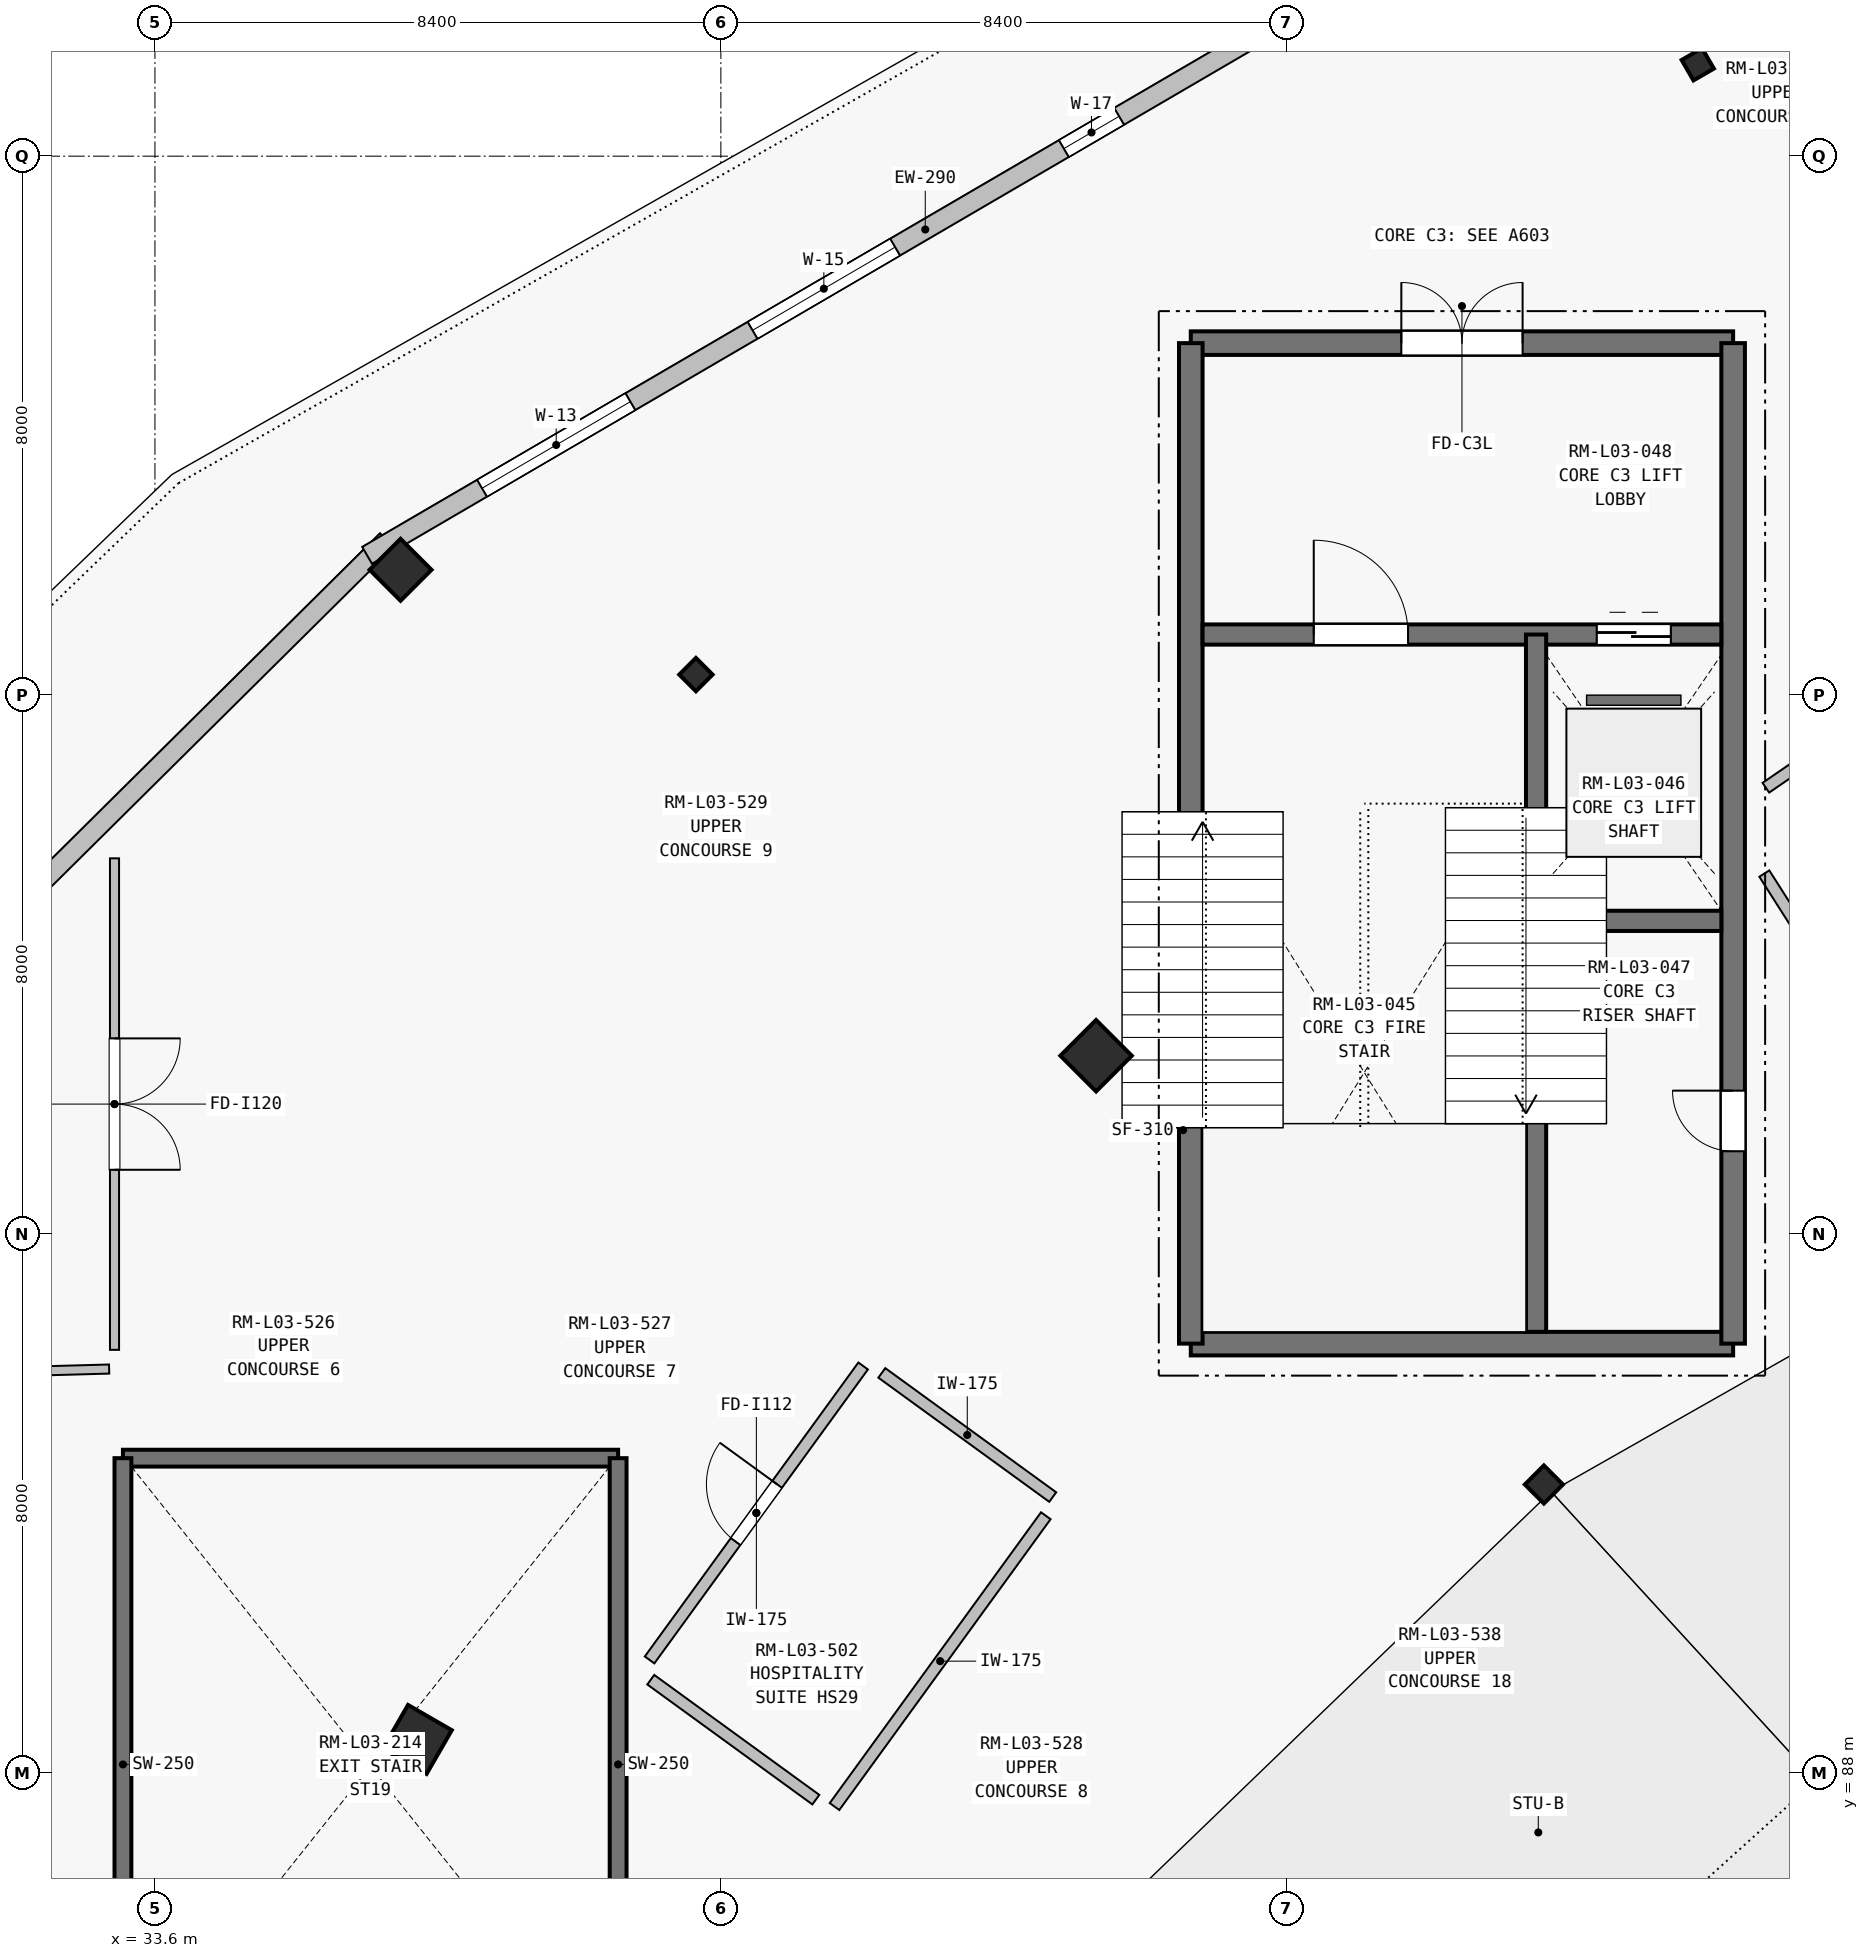
"""IFC4 building model, lengths in metres.
Left out: names, types, materials, properties, quantities, classifications, styles, units other than length and angle.
Written with IfcOpenShell. Run it as: python <this file> out.ifc"""

import sys

from ifc_helpers import new_model, si_unit, direction, frame, frame_2d, origin, origin_2d, place, context, subcontext, project, spatial, rectangle, i_section, extrude, element, fill, save


model = new_model("IFC4")
c1 = context("Model", 3, precision=1e-05, world=origin(), true_north=direction((0.0, 1.0)))
c2 = subcontext(c1, "Body", "Model", "MODEL_VIEW")
j1 = project(units=[si_unit("LENGTHUNIT", "METRE"), si_unit("PLANEANGLEUNIT", "RADIAN")], contexts=[c1])
p1 = place(None, origin())
s1 = spatial("IfcSite", under=j1, at=p1, CompositionType="ELEMENT")
p2 = place(p1, origin())
s2 = spatial("IfcBuilding", under=s1, at=p2, CompositionType="ELEMENT")
p3 = place(p2, frame((0.0, 0.0, 14.4)))
s3 = spatial("IfcBuildingStorey", under=s2, at=p3, CompositionType="ELEMENT", Elevation=14.4)
p4 = place(p3, frame((54.216, 92.284, 0.0), z_axis=(0.0, 0.0, 1.0), x_axis=(-0.707106781187, 0.707106781187, 0.0)))
e1 = element("IfcColumn", 1, at=p4, inside=s3, PredefinedType="COLUMN", context=c2, shape_type="SweptSolid", body=[
    extrude(i_section(OverallWidth=0.4, OverallDepth=0.4, WebThickness=0.016, FlangeThickness=0.028, at=origin_2d()), origin(), (0.0, 0.0, 1.0), 4.5),
])
for number, where, z_axis, x_axis in (
    (2, (47.569, 98.648, 0.0), (0.0, 0.0, 1.0), (-0.707, 0.707, 0.0)),
    (3, (37.494, 88.5, 0.0), (0.0, 0.0, 1.0), (-0.866, 0.5, 0.0)),
):
    element("IfcColumn", number, at=place(p3, frame(where, z_axis=z_axis, x_axis=x_axis)), inside=s3, PredefinedType="COLUMN", context=c2, shape_type="SweptSolid", body=[
        extrude(rectangle(XDim=0.75, YDim=0.75, at=origin_2d()), origin(), (0.0, 0.0, 1.0), 4.5),
    ])
for number, where, z_axis, x_axis in (
    (4, (56.5, 113.363, 0.0), (0.0, 0.0, 1.0), (-0.5, 0.866, 0.0)),
    (5, (41.63, 104.305, 0.0), (0.0, 0.0, 1.0), (-0.707, 0.707, 0.0)),
):
    element("IfcColumn", number, at=place(p3, frame(where, z_axis=z_axis, x_axis=x_axis)), inside=s3, PredefinedType="COLUMN", context=c2, shape_type="SweptSolid", body=[
        extrude(i_section(OverallWidth=0.35, OverallDepth=0.35, WebThickness=0.014, FlangeThickness=0.024, at=origin_2d()), origin(), (0.0, 0.0, 1.0), 4.5),
    ])
p5 = place(p3, frame((37.246, 105.861, 0.0), z_axis=(0.0, 0.0, 1.0), x_axis=(-0.707106781187, 0.707106781187, 0.0)))
e6 = element("IfcColumn", 6, at=p5, inside=s3, PredefinedType="COLUMN", context=c2, shape_type="SweptSolid", body=[
    extrude(rectangle(XDim=0.65, YDim=0.65, at=origin_2d()), origin(), (0.0, 0.0, 1.0), 4.26),
])
p6 = place(p3, frame((24.313, 93.679, 0.0), z_axis=(0.0, 0.0, 1.0), x_axis=(0.71011693404, 0.704083759214, 0.0)))
e7 = element("IfcWall", 7, at=p6, inside=s3, PredefinedType="SOLIDWALL", context=c2, shape_type="SweptSolid", body=[
    extrude(rectangle(XDim=17.927, YDim=0.29, at=frame_2d((8.963, 0.0))), origin(), (0.0, 0.0, 1.0), 4.26),
])
p7 = place(p6, frame((1.825, 0.0, 0.9)))
e8 = element("IfcOpeningElement", 8, at=p7, cuts=e7, PredefinedType="OPENING", context=c2, shape_type="SweptSolid", body=[
    extrude(rectangle(XDim=2.85, YDim=1.6, at=frame_2d((1.425, 0.8))), frame((0.0, 0.155, 0.0), z_axis=(0.0, -1.0, 0.0), x_axis=(1.0, 0.0, 0.0)), (0.0, 0.0, 1.0), 0.31),
])
p8 = place(p6, frame((6.575, 0.0, 0.9)))
e9 = element("IfcOpeningElement", 9, at=p8, cuts=e7, PredefinedType="OPENING", context=c2, shape_type="SweptSolid", body=[
    extrude(rectangle(XDim=2.55, YDim=1.55, at=frame_2d((1.275, 0.775))), frame((0.0, 0.155, 0.0), z_axis=(0.0, -1.0, 0.0), x_axis=(1.0, 0.0, 0.0)), (0.0, 0.0, 1.0), 0.31),
])
p9 = place(p3, frame((36.749, 106.075, 0.0), z_axis=(0.0, 0.0, 1.0), x_axis=(0.863607623942, 0.504164528572, 0.0)))
e10 = element("IfcWall", 10, at=p9, inside=s3, PredefinedType="SOLIDWALL", context=c2, shape_type="SweptSolid", body=[
    extrude(rectangle(XDim=19.186, YDim=0.29, at=frame_2d((9.593, 0.0))), origin(), (0.0, 0.0, 1.0), 4.26),
])
p10 = place(p9, frame((1.975, 0.0, 0.9)))
e11 = element("IfcOpeningElement", 11, at=p10, cuts=e10, PredefinedType="OPENING", context=c2, shape_type="SweptSolid", body=[
    extrude(rectangle(XDim=2.55, YDim=1.55, at=frame_2d((1.275, 0.775))), frame((0.0, 0.155, 0.0), z_axis=(0.0, -1.0, 0.0), x_axis=(1.0, 0.0, 0.0)), (0.0, 0.0, 1.0), 0.31),
])
p11 = place(p9, frame((6.625, 0.0, 0.9)))
e12 = element("IfcOpeningElement", 12, at=p11, cuts=e10, PredefinedType="OPENING", context=c2, shape_type="SweptSolid", body=[
    extrude(rectangle(XDim=2.45, YDim=1.35, at=frame_2d((1.225, 0.675))), frame((0.0, 0.155, 0.0), z_axis=(0.0, -1.0, 0.0), x_axis=(1.0, 0.0, 0.0)), (0.0, 0.0, 1.0), 0.31),
])
p12 = place(p9, frame((11.975, 0.0, 0.75)))
e13 = element("IfcOpeningElement", 13, at=p12, cuts=e10, PredefinedType="OPENING", context=c2, shape_type="SweptSolid", body=[
    extrude(rectangle(XDim=0.95, YDim=2.2, at=frame_2d((0.475, 1.1))), frame((0.0, 0.155, 0.0), z_axis=(0.0, -1.0, 0.0), x_axis=(1.0, 0.0, 0.0)), (0.0, 0.0, 1.0), 0.31),
])
p13 = place(p3, frame((48.975, 94.375, 0.0), z_axis=(0.0, 0.0, 1.0), x_axis=(1.0, 0.0, 0.0)))
e14 = element("IfcWall", 14, at=p13, inside=s3, PredefinedType="SHEAR", context=c2, shape_type="SweptSolid", body=[
    extrude(rectangle(XDim=8.05, YDim=0.35, at=frame_2d((4.025, 0.0))), origin(), (0.0, 0.0, 1.0), 4.5),
])
p14 = place(p3, frame((48.975, 109.225, 0.0), z_axis=(0.0, 0.0, 1.0), x_axis=(1.0, 0.0, 0.0)))
e15 = element("IfcWall", 15, at=p14, inside=s3, PredefinedType="SHEAR", context=c2, shape_type="SweptSolid", body=[
    extrude(rectangle(XDim=8.05, YDim=0.35, at=frame_2d((4.025, 0.0))), origin(), (0.0, 0.0, 1.0), 4.5),
])
p15 = place(p14, frame((3.125, 0.0, 0.0)))
e16 = element("IfcOpeningElement", 16, at=p15, cuts=e15, PredefinedType="OPENING", context=c2, shape_type="SweptSolid", body=[
    extrude(rectangle(XDim=1.8, YDim=2.25, at=frame_2d((0.9, 1.125))), frame((0.0, 0.185, 0.0), z_axis=(0.0, -1.0, 0.0), x_axis=(1.0, 0.0, 0.0)), (0.0, 0.0, 1.0), 0.37),
])
p16 = place(p3, frame((48.975, 94.375, 0.0), z_axis=(0.0, 0.0, 1.0), x_axis=(0.0, 1.0, 0.0)))
e17 = element("IfcWall", 17, at=p16, inside=s3, PredefinedType="SHEAR", context=c2, shape_type="SweptSolid", body=[
    extrude(rectangle(XDim=14.85, YDim=0.35, at=frame_2d((7.425, 0.0))), origin(), (0.0, 0.0, 1.0), 4.5),
])
p17 = place(p3, frame((57.025, 94.375, 0.0), z_axis=(0.0, 0.0, 1.0), x_axis=(0.0, 1.0, 0.0)))
e18 = element("IfcWall", 18, at=p17, inside=s3, PredefinedType="SHEAR", context=c2, shape_type="SweptSolid", body=[
    extrude(rectangle(XDim=14.85, YDim=0.35, at=frame_2d((7.425, 0.0))), origin(), (0.0, 0.0, 1.0), 4.5),
])
p18 = place(p17, frame((2.855, 0.0, 0.0)))
e19 = element("IfcOpeningElement", 19, at=p18, cuts=e18, PredefinedType="OPENING", context=c2, shape_type="SweptSolid", body=[
    extrude(rectangle(XDim=0.9, YDim=2.1, at=frame_2d((0.45, 1.05))), frame((0.0, 0.185, 0.0), z_axis=(0.0, -1.0, 0.0), x_axis=(1.0, 0.0, 0.0)), (0.0, 0.0, 1.0), 0.37),
])
p19 = place(p3, frame((49.15, 104.9, 0.0), z_axis=(0.0, 0.0, 1.0), x_axis=(1.0, 0.0, 0.0)))
e20 = element("IfcWall", 20, at=p19, inside=s3, PredefinedType="SHEAR", context=c2, shape_type="SweptSolid", body=[
    extrude(rectangle(XDim=7.7, YDim=0.3, at=frame_2d((3.85, 0.0))), origin(), (0.0, 0.0, 1.0), 4.5),
])
p20 = place(p19, frame((1.65, 0.0, 0.0)))
e21 = element("IfcOpeningElement", 21, at=p20, cuts=e20, PredefinedType="OPENING", context=c2, shape_type="SweptSolid", body=[
    extrude(rectangle(XDim=1.4, YDim=2.2, at=frame_2d((0.7, 1.1))), frame((0.0, 0.16, 0.0), z_axis=(0.0, -1.0, 0.0), x_axis=(1.0, 0.0, 0.0)), (0.0, 0.0, 1.0), 0.32),
])
p21 = place(p19, frame((5.85, 0.0, 0.0)))
e22 = element("IfcOpeningElement", 22, at=p21, cuts=e20, PredefinedType="OPENING", context=c2, shape_type="SweptSolid", body=[
    extrude(rectangle(XDim=1.1, YDim=2.2, at=frame_2d((0.55, 1.1))), frame((0.0, 0.16, 0.0), z_axis=(0.0, -1.0, 0.0), x_axis=(1.0, 0.0, 0.0)), (0.0, 0.0, 1.0), 0.32),
])
p22 = place(p3, frame((54.1, 94.55, 0.0), z_axis=(0.0, 0.0, 1.0), x_axis=(0.0, 1.0, 0.0)))
e23 = element("IfcWall", 23, at=p22, inside=s3, PredefinedType="SHEAR", context=c2, shape_type="SweptSolid", body=[
    extrude(rectangle(XDim=10.35, YDim=0.3, at=frame_2d((5.175, 0.0))), origin(), (0.0, 0.0, 1.0), 4.5),
])
p23 = place(p3, frame((54.25, 100.65, 0.0), z_axis=(0.0, 0.0, 1.0), x_axis=(1.0, 0.0, 0.0)))
e24 = element("IfcWall", 24, at=p23, inside=s3, PredefinedType="SHEAR", context=c2, shape_type="SweptSolid", body=[
    extrude(rectangle(XDim=2.6, YDim=0.3, at=frame_2d((1.3, 0.0))), origin(), (0.0, 0.0, 1.0), 4.5),
])
p24 = place(p3, frame((33.125, 92.675, 0.0), z_axis=(0.0, 0.0, 1.0), x_axis=(1.0, 0.0, 0.0)))
e25 = element("IfcWall", 25, at=p24, inside=s3, PredefinedType="SHEAR", context=c2, shape_type="SweptSolid", body=[
    extrude(rectangle(XDim=7.35, YDim=0.25, at=frame_2d((3.675, 0.0))), origin(), (0.0, 0.0, 1.0), 4.5),
])
for number, where, z_axis, x_axis in (
    (26, (33.125, 79.925, 0.0), (0.0, 0.0, 1.0), (0.0, 1.0, 0.0)),
    (27, (40.475, 79.925, 0.0), (0.0, 0.0, 1.0), (0.0, 1.0, 0.0)),
):
    element("IfcWall", number, at=place(p3, frame(where, z_axis=z_axis, x_axis=x_axis)), inside=s3, PredefinedType="SHEAR", context=c2, shape_type="SweptSolid", body=[
        extrude(rectangle(XDim=12.75, YDim=0.25, at=frame_2d((6.375, 0.0))), origin(), (0.0, 0.0, 1.0), 4.5),
    ])
p25 = place(p3, frame((57.511, 102.626, 0.0), z_axis=(0.0, 0.0, 1.0), x_axis=(0.82466590382, 0.565620143805, 0.0)))
e28 = element("IfcWall", 28, at=p25, inside=s3, PredefinedType="PARTITIONING", context=c2, shape_type="SweptSolid", body=[
    extrude(rectangle(XDim=3.308, YDim=0.175, at=frame_2d((1.654, 0.0))), origin(), (0.0, 0.0, 1.0), 4.19),
])
p26 = place(p25, frame((1.154, 0.0, 0.0)))
e29 = element("IfcOpeningElement", 29, at=p26, cuts=e28, PredefinedType="OPENING", context=c2, shape_type="SweptSolid", body=[
    extrude(rectangle(XDim=1.0, YDim=2.2, at=frame_2d((0.5, 1.1))), frame((0.0, 0.097, 0.0), z_axis=(0.0, -1.0, 0.0), x_axis=(1.0, 0.0, 0.0)), (0.0, 0.0, 1.0), 0.195),
])
p27 = place(p3, frame((58.573, 99.649, 0.0), z_axis=(0.0, 0.0, 1.0), x_axis=(-0.537274578012, 0.843407391373, 0.0)))
e30 = element("IfcWall", 30, at=p27, inside=s3, PredefinedType="PARTITIONING", context=c2, shape_type="SweptSolid", body=[
    extrude(rectangle(XDim=2.019, YDim=0.175, at=frame_2d((1.009, 0.0))), origin(), (0.0, 0.0, 1.0), 4.19),
])
p28 = place(p3, frame((40.942, 89.68, 0.0), z_axis=(0.0, 0.0, 1.0), x_axis=(0.587805549797, 0.809002246986, 0.0)))
e31 = element("IfcWall", 31, at=p28, inside=s3, PredefinedType="PARTITIONING", context=c2, shape_type="SweptSolid", body=[
    extrude(rectangle(XDim=5.393, YDim=0.175, at=frame_2d((2.696, 0.0))), origin(), (0.0, 0.0, 1.0), 4.19),
])
p29 = place(p28, frame((2.171, 0.0, 0.0)))
e32 = element("IfcOpeningElement", 32, at=p29, cuts=e31, PredefinedType="OPENING", context=c2, shape_type="SweptSolid", body=[
    extrude(rectangle(XDim=1.05, YDim=2.25, at=frame_2d((0.525, 1.125))), frame((0.0, 0.097, 0.0), z_axis=(0.0, -1.0, 0.0), x_axis=(1.0, 0.0, 0.0)), (0.0, 0.0, 1.0), 0.195),
])
p30 = place(p3, frame((44.389, 93.94, 0.0), z_axis=(0.0, 0.0, 1.0), x_axis=(0.809045759439, -0.587745658541, 0.0)))
e33 = element("IfcWall", 33, at=p30, inside=s3, PredefinedType="PARTITIONING", context=c2, shape_type="SweptSolid", body=[
    extrude(rectangle(XDim=3.135, YDim=0.175, at=frame_2d((1.568, 0.0))), origin(), (0.0, 0.0, 1.0), 4.19),
])
p31 = place(p3, frame((46.823, 91.82, 0.0), z_axis=(0.0, 0.0, 1.0), x_axis=(-0.587777109059, -0.809022910718, 0.0)))
e34 = element("IfcWall", 34, at=p31, inside=s3, PredefinedType="PARTITIONING", context=c2, shape_type="SweptSolid", body=[
    extrude(rectangle(XDim=5.335, YDim=0.175, at=frame_2d((2.668, 0.0))), origin(), (0.0, 0.0, 1.0), 4.19),
])
p32 = place(p3, frame((43.41, 87.607, 0.0), z_axis=(0.0, 0.0, 1.0), x_axis=(-0.809011407489, 0.587792941904, 0.0)))
e35 = element("IfcWall", 35, at=p32, inside=s3, PredefinedType="PARTITIONING", context=c2, shape_type="SweptSolid", body=[
    extrude(rectangle(XDim=3.028, YDim=0.175, at=frame_2d((1.514, 0.0))), origin(), (0.0, 0.0, 1.0), 4.19),
])
p33 = place(p3, frame((25.136, 93.784, 0.0), z_axis=(0.0, 0.0, 1.0), x_axis=(0.999621901922, 0.027496421541, 0.0)))
e36 = element("IfcWall", 36, at=p33, inside=s3, PredefinedType="PARTITIONING", context=c2, shape_type="SweptSolid", body=[
    extrude(rectangle(XDim=7.787, YDim=0.135, at=frame_2d((3.894, 0.0))), origin(), (0.0, 0.0, 1.0), 3.553),
])
p34 = place(p3, frame((33.0, 101.578, 0.0), z_axis=(0.0, 0.0, 1.0), x_axis=(0.0, -1.0, 0.0)))
e37 = element("IfcWall", 37, at=p34, inside=s3, PredefinedType="PARTITIONING", context=c2, shape_type="SweptSolid", body=[
    extrude(rectangle(XDim=7.295, YDim=0.135, at=frame_2d((3.648, 0.0))), origin(), (0.0, 0.0, 1.0), 3.553),
])
p35 = place(p34, frame((2.673, 0.0, 0.0)))
e38 = element("IfcOpeningElement", 38, at=p35, cuts=e37, PredefinedType="OPENING", context=c2, shape_type="SweptSolid", body=[
    extrude(rectangle(XDim=1.95, YDim=2.4, at=frame_2d((0.975, 1.2))), frame((0.0, 0.077, 0.0), z_axis=(0.0, -1.0, 0.0), x_axis=(1.0, 0.0, 0.0)), (0.0, 0.0, 1.0), 0.155),
])
p36 = place(p10, origin())
e39 = element("IfcWindow", 39, at=p36, inside=s3, PartitioningType="SINGLE_PANEL", PredefinedType="WINDOW", context=c2, shape_type="SweptSolid", body=[
    extrude(rectangle(XDim=2.55, YDim=1.55, at=frame_2d((1.275, 0.775))), frame((0.0, 0.03, 0.0), z_axis=(0.0, -1.0, 0.0), x_axis=(1.0, 0.0, 0.0)), (0.0, 0.0, 1.0), 0.06),
])
fill(e11, e39)
p37 = place(p11, origin())
e40 = element("IfcWindow", 40, at=p37, inside=s3, PartitioningType="SINGLE_PANEL", PredefinedType="WINDOW", context=c2, shape_type="SweptSolid", body=[
    extrude(rectangle(XDim=2.45, YDim=1.35, at=frame_2d((1.225, 0.675))), frame((0.0, 0.03, 0.0), z_axis=(0.0, -1.0, 0.0), x_axis=(1.0, 0.0, 0.0)), (0.0, 0.0, 1.0), 0.06),
])
fill(e12, e40)
p38 = place(p12, origin())
e41 = element("IfcWindow", 41, at=p38, inside=s3, PartitioningType="SINGLE_PANEL", PredefinedType="WINDOW", context=c2, shape_type="SweptSolid", body=[
    extrude(rectangle(XDim=0.95, YDim=2.2, at=frame_2d((0.475, 1.1))), frame((0.0, 0.03, 0.0), z_axis=(0.0, -1.0, 0.0), x_axis=(1.0, 0.0, 0.0)), (0.0, 0.0, 1.0), 0.06),
])
fill(e13, e41)
p39 = place(p15, origin())
e42 = element("IfcDoor", 42, at=p39, inside=s3, OperationType="DOUBLE_DOOR_SINGLE_SWING", PredefinedType="DOOR", context=c2, shape_type="SweptSolid", body=[
    extrude(rectangle(XDim=1.8, YDim=2.25, at=frame_2d((0.9, 1.125))), frame((0.0, 0.025, 0.0), z_axis=(0.0, -1.0, 0.0), x_axis=(1.0, 0.0, 0.0)), (0.0, 0.0, 1.0), 0.05),
])
fill(e16, e42)
p40 = place(p20, origin())
e43 = element("IfcDoor", 43, at=p40, inside=s3, OperationType="SINGLE_SWING_LEFT", PredefinedType="DOOR", context=c2, shape_type="SweptSolid", body=[
    extrude(rectangle(XDim=1.4, YDim=2.2, at=frame_2d((0.7, 1.1))), frame((0.0, 0.025, 0.0), z_axis=(0.0, -1.0, 0.0), x_axis=(1.0, 0.0, 0.0)), (0.0, 0.0, 1.0), 0.05),
])
fill(e21, e43)
p41 = place(p18, origin())
e44 = element("IfcDoor", 44, at=p41, inside=s3, OperationType="SINGLE_SWING_RIGHT", PredefinedType="DOOR", context=c2, shape_type="SweptSolid", body=[
    extrude(rectangle(XDim=0.9, YDim=2.1, at=frame_2d((0.45, 1.05))), frame((0.0, 0.025, 0.0), z_axis=(0.0, -1.0, 0.0), x_axis=(1.0, 0.0, 0.0)), (0.0, 0.0, 1.0), 0.05),
])
fill(e19, e44)
p42 = place(p21, origin())
e45 = element("IfcDoor", 45, at=p42, inside=s3, OperationType="SLIDING_TO_LEFT", PredefinedType="DOOR", context=c2, shape_type="SweptSolid", body=[
    extrude(rectangle(XDim=1.1, YDim=2.2, at=frame_2d((0.55, 1.1))), frame((0.0, 0.025, 0.0), z_axis=(0.0, -1.0, 0.0), x_axis=(1.0, 0.0, 0.0)), (0.0, 0.0, 1.0), 0.05),
])
fill(e22, e45)
p43 = place(p29, origin())
e46 = element("IfcDoor", 46, at=p43, inside=s3, OperationType="SINGLE_SWING_RIGHT", PredefinedType="DOOR", context=c2, shape_type="SweptSolid", body=[
    extrude(rectangle(XDim=1.05, YDim=2.25, at=frame_2d((0.525, 1.125))), frame((0.0, 0.025, 0.0), z_axis=(0.0, -1.0, 0.0), x_axis=(1.0, 0.0, 0.0)), (0.0, 0.0, 1.0), 0.05),
])
fill(e32, e46)
p44 = place(p35, origin())
e47 = element("IfcDoor", 47, at=p44, inside=s3, OperationType="DOUBLE_DOOR_SINGLE_SWING", PredefinedType="DOOR", context=c2, shape_type="SweptSolid", body=[
    extrude(rectangle(XDim=1.95, YDim=2.4, at=frame_2d((0.975, 1.2))), frame((0.0, 0.025, 0.0), z_axis=(0.0, -1.0, 0.0), x_axis=(1.0, 0.0, 0.0)), (0.0, 0.0, 1.0), 0.05),
])
fill(e38, e47)
save(model, sys.argv[1])
